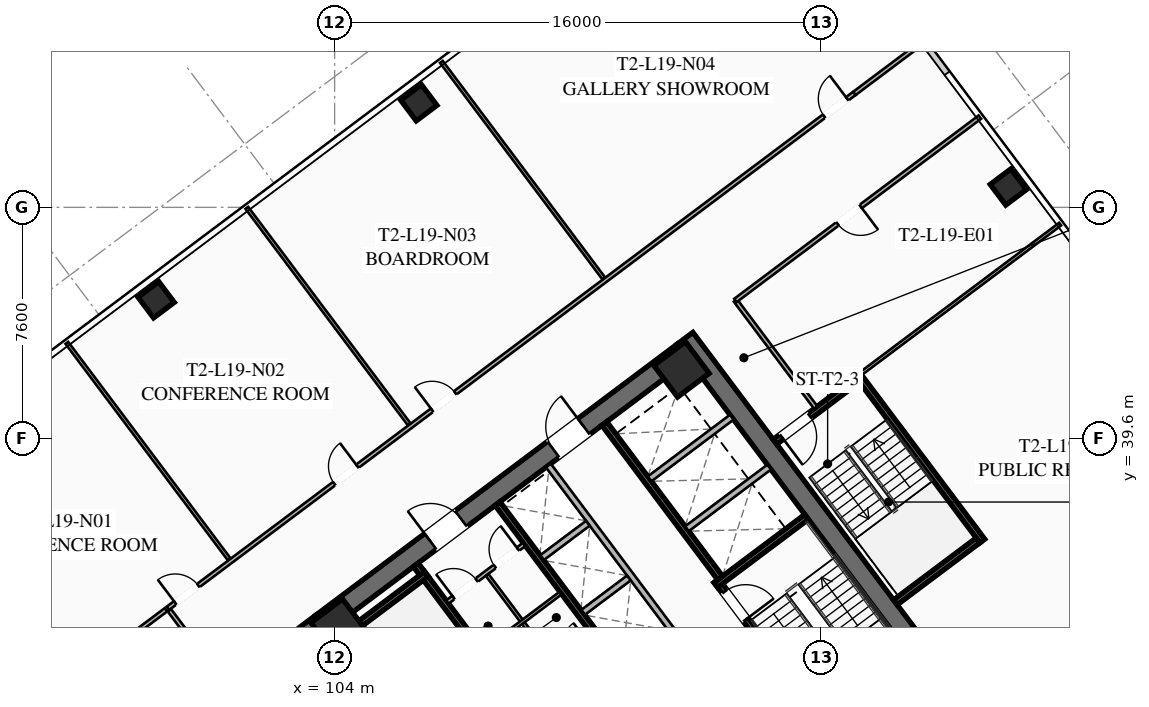
"""IFC4 building model, lengths in metres.
Left out: names, types, materials, properties, quantities, classifications, styles, units other than length and angle.
Written with IfcOpenShell. Run it as: python <this file> out.ifc"""

import sys

from ifc_helpers import new_model, si_unit, direction, frame, frame_2d, origin, origin_2d, place, context, subcontext, project, spatial, rectangle, hollow_rectangle, extrude, element, fill, save


model = new_model("IFC4")
c1 = context("Model", 3, precision=1e-05, world=origin(), true_north=direction((0.0, 1.0)))
c2 = subcontext(c1, "Body", "Model", "MODEL_VIEW")
j1 = project(units=[si_unit("LENGTHUNIT", "METRE"), si_unit("PLANEANGLEUNIT", "RADIAN")], contexts=[c1])
p1 = place(None, origin())
s1 = spatial("IfcSite", under=j1, at=p1, CompositionType="ELEMENT")
p2 = place(p1, origin())
s2 = spatial("IfcBuilding", under=s1, at=p2, CompositionType="ELEMENT")
p3 = place(p2, frame((0.0, 0.0, 74.3)))
s3 = spatial("IfcBuildingStorey", under=s2, at=p3, CompositionType="ELEMENT", Elevation=74.3)
for number, where, z_axis, x_axis in (
    (1, (112.476, 21.107, 0.0), (0.0, 0.0, 1.0), (-0.6, 0.8, 0.0)),
    (2, (115.524, 42.893, 0.0), (0.0, 0.0, 1.0), (0.6, -0.8, 0.0)),
):
    element("IfcWall", number, at=place(p3, frame(where, z_axis=z_axis, x_axis=x_axis)), inside=s3, PredefinedType="SHEAR", context=c2, shape_type="SweptSolid", body=[
        extrude(rectangle(XDim=15.6, YDim=0.65, at=frame_2d((7.8, 0.0))), origin(), (0.0, 0.0, 1.0), 3.55),
    ])
p4 = place(p3, frame((103.571, 33.522, 0.0), z_axis=(0.0, 0.0, 1.0), x_axis=(0.799998028465, 0.600002628705, 0.0)))
e3 = element("IfcWall", 3, at=p4, inside=s3, PredefinedType="SHEAR", context=c2, shape_type="SweptSolid", body=[
    extrude(rectangle(XDim=14.86, YDim=0.65, at=frame_2d((7.43, 0.0))), origin(), (0.0, 0.0, 1.0), 3.55),
])
p5 = place(p4, frame((4.48, 0.0, 0.0)))
e4 = element("IfcOpeningElement", 4, at=p5, cuts=e3, PredefinedType="OPENING", context=c2, shape_type="SweptSolid", body=[
    extrude(rectangle(XDim=1.25, YDim=2.25, at=frame_2d((0.625, 1.125))), frame((0.0, 0.335, 0.0), z_axis=(0.0, -1.0, 0.0), x_axis=(1.0, 0.0, 0.0)), (0.0, 0.0, 1.0), 0.67),
])
p6 = place(p4, frame((9.53, 0.0, 0.0)))
e5 = element("IfcOpeningElement", 5, at=p6, cuts=e3, PredefinedType="OPENING", context=c2, shape_type="SweptSolid", body=[
    extrude(rectangle(XDim=1.25, YDim=2.25, at=frame_2d((0.625, 1.125))), frame((0.0, 0.335, 0.0), z_axis=(0.0, -1.0, 0.0), x_axis=(1.0, 0.0, 0.0)), (0.0, 0.0, 1.0), 0.67),
])
for number, where, z_axis, x_axis in (
    (6, (115.41, 41.87, 0.0), (0.0, 0.0, 1.0), (0.8, 0.6, 0.0)),
    (7, (104.13, 33.41, 0.0), (0.0, 0.0, 1.0), (0.8, 0.6, 0.0)),
):
    element("IfcColumn", number, at=place(p3, frame(where, z_axis=z_axis, x_axis=x_axis)), inside=s3, PredefinedType="COLUMN", context=c2, shape_type="SweptSolid", body=[
        extrude(hollow_rectangle(XDim=1.3, YDim=1.3, WallThickness=0.05, at=origin_2d()), origin(), (0.0, 0.0, 1.0), 3.35),
    ])
for number, where, z_axis, x_axis in (
    (8, (126.16, 47.87, 0.0), (0.0, 0.0, 1.0), (0.8, 0.6, 0.0)),
    (9, (106.77, 50.64, 0.0), (0.0, 0.0, 1.0), (0.8, 0.6, 0.0)),
    (10, (98.13, 44.16, 0.0), (0.0, 0.0, 1.0), (0.8, 0.6, 0.0)),
):
    element("IfcColumn", number, at=place(p3, frame(where, z_axis=z_axis, x_axis=x_axis)), inside=s3, PredefinedType="COLUMN", context=c2, shape_type="SweptSolid", body=[
        extrude(hollow_rectangle(XDim=0.85, YDim=0.85, WallThickness=0.035, at=origin_2d()), origin(), (0.0, 0.0, 1.0), 3.35),
    ])
p7 = place(p3, frame((111.44, 29.08, 0.0), z_axis=(0.0, 0.0, 1.0), x_axis=(-0.600009827119, 0.799992629566, 0.0)))
e11 = element("IfcWall", 11, at=p7, inside=s3, PredefinedType="SHEAR", context=c2, shape_type="SweptSolid", body=[
    extrude(rectangle(XDim=7.95, YDim=0.2, at=frame_2d((3.975, 0.0))), origin(), (0.0, 0.0, 1.0), 3.35),
])
p8 = place(p7, frame((0.45, 0.0, 0.0)))
e12 = element("IfcOpeningElement", 12, at=p8, cuts=e11, PredefinedType="OPENING", context=c2, shape_type="SweptSolid", body=[
    extrude(rectangle(XDim=1.15, YDim=2.2, at=frame_2d((0.575, 1.1))), frame((0.0, 0.11, 0.0), z_axis=(0.0, -1.0, 0.0), x_axis=(1.0, 0.0, 0.0)), (0.0, 0.0, 1.0), 0.22),
])
p9 = place(p3, frame((104.036, 32.902, 0.0), z_axis=(0.0, 0.0, 1.0), x_axis=(0.800039270442, 0.59994763584, 0.0)))
e13 = element("IfcWall", 13, at=p9, inside=s3, PredefinedType="SHEAR", context=c2, shape_type="SweptSolid", body=[
    extrude(rectangle(XDim=3.73, YDim=0.2, at=frame_2d((1.865, 0.0))), origin(), (0.0, 0.0, 1.0), 3.35),
])
p10 = place(p3, frame((116.56, 34.92, 0.0), z_axis=(0.0, 0.0, 1.0), x_axis=(0.600009827119, -0.799992629566, 0.0)))
e14 = element("IfcWall", 14, at=p10, inside=s3, PredefinedType="SHEAR", context=c2, shape_type="SweptSolid", body=[
    extrude(rectangle(XDim=7.95, YDim=0.2, at=frame_2d((3.975, 0.0))), origin(), (0.0, 0.0, 1.0), 3.35),
])
p11 = place(p10, frame((0.45, 0.0, 0.0)))
e15 = element("IfcOpeningElement", 15, at=p11, cuts=e14, PredefinedType="OPENING", context=c2, shape_type="SweptSolid", body=[
    extrude(rectangle(XDim=1.15, YDim=2.2, at=frame_2d((0.575, 1.1))), frame((0.0, 0.11, 0.0), z_axis=(0.0, -1.0, 0.0), x_axis=(1.0, 0.0, 0.0)), (0.0, 0.0, 1.0), 0.22),
])
p12 = place(p3, frame((116.54, 34.78, 0.0), z_axis=(0.0, 0.0, 1.0), x_axis=(0.799984290658, 0.600020945218, 0.0)))
e16 = element("IfcWall", 16, at=p12, inside=s3, PredefinedType="SHEAR", context=c2, shape_type="SweptSolid", body=[
    extrude(rectangle(XDim=3.73, YDim=0.2, at=frame_2d((1.865, 0.0))), origin(), (0.0, 0.0, 1.0), 3.35),
])
p13 = place(p3, frame((117.938, 26.016, 0.0), z_axis=(0.0, 0.0, 1.0), x_axis=(-0.600005463273, 0.799995902516, 0.0)))
e17 = element("IfcWall", 17, at=p13, inside=s3, PredefinedType="SHEAR", context=c2, shape_type="SweptSolid", body=[
    extrude(rectangle(XDim=14.3, YDim=0.2, at=frame_2d((7.15, 0.0))), origin(), (0.0, 0.0, 1.0), 3.35),
])
p14 = place(p3, frame((112.87, 40.09, 0.0), z_axis=(0.0, 0.0, 1.0), x_axis=(0.599975393228, -0.800018454488, 0.0)))
e18 = element("IfcWall", 18, at=p14, inside=s3, PredefinedType="SHEAR", context=c2, shape_type="SweptSolid", body=[
    extrude(rectangle(XDim=6.35, YDim=0.2, at=frame_2d((3.175, 0.0))), origin(), (0.0, 0.0, 1.0), 3.35),
])
for number, where, z_axis, x_axis in (
    (19, (115.59, 36.63, 0.0), (0.0, 0.0, 1.0), (0.8, 0.6, 0.0)),
    (20, (114.36, 38.27, 0.0), (0.0, 0.0, 1.0), (0.8, 0.6, 0.0)),
):
    element("IfcWall", number, at=place(p3, frame(where, z_axis=z_axis, x_axis=x_axis)), inside=s3, PredefinedType="SOLIDWALL", context=c2, shape_type="SweptSolid", body=[
        extrude(rectangle(XDim=3.38, YDim=0.2, at=frame_2d((1.69, 0.0))), origin(), (0.0, 0.0, 1.0), 3.35),
    ])
p15 = place(p3, frame((107.71, 34.22, 0.0), z_axis=(0.0, 0.0, 1.0), x_axis=(0.799981399002, 0.60002480053, 0.0)))
e21 = element("IfcWall", 21, at=p15, inside=s3, PredefinedType="PARTITIONING", context=c2, shape_type="SweptSolid", body=[
    extrude(rectangle(XDim=3.15, YDim=0.135, at=frame_2d((1.575, 0.0))), origin(), (0.0, 0.0, 1.0), 2.703),
])
p16 = place(p15, frame((0.25, 0.0, 0.0)))
e22 = element("IfcOpeningElement", 22, at=p16, cuts=e21, PredefinedType="OPENING", context=c2, shape_type="SweptSolid", body=[
    extrude(rectangle(XDim=0.95, YDim=2.05, at=frame_2d((0.475, 1.025))), frame((0.0, 0.077, 0.0), z_axis=(0.0, -1.0, 0.0), x_axis=(1.0, 0.0, 0.0)), (0.0, 0.0, 1.0), 0.155),
])
p17 = place(p15, frame((1.95, 0.0, 0.0)))
e23 = element("IfcOpeningElement", 23, at=p17, cuts=e21, PredefinedType="OPENING", context=c2, shape_type="SweptSolid", body=[
    extrude(rectangle(XDim=0.95, YDim=2.05, at=frame_2d((0.475, 1.025))), frame((0.0, 0.077, 0.0), z_axis=(0.0, -1.0, 0.0), x_axis=(1.0, 0.0, 0.0)), (0.0, 0.0, 1.0), 0.155),
])
p18 = place(p3, frame((111.296, 32.072, 0.0), z_axis=(0.0, 0.0, 1.0), x_axis=(-0.59995887973, 0.800030838552, 0.0)))
e24 = element("IfcWall", 24, at=p18, inside=s3, PredefinedType="PARTITIONING", context=c2, shape_type="SweptSolid", body=[
    extrude(rectangle(XDim=3.8, YDim=0.11, at=frame_2d((1.9, 0.0))), origin(), (0.0, 0.0, 1.0), 2.703),
])
p19 = place(p3, frame((108.91, 32.62, 0.0), z_axis=(0.0, 0.0, 1.0), x_axis=(0.800018601094, 0.59997519774, 0.0)))
e25 = element("IfcWall", 25, at=p19, inside=s3, PredefinedType="PARTITIONING", context=c2, shape_type="SweptSolid", body=[
    extrude(rectangle(XDim=3.15, YDim=0.11, at=frame_2d((1.575, 0.0))), origin(), (0.0, 0.0, 1.0), 2.703),
])
p20 = place(p3, frame((115.11, 33.27, 0.0), z_axis=(0.0, 0.0, 1.0), x_axis=(-0.600011488909, 0.79999138319, 0.0)))
e26 = element("IfcWall", 26, at=p20, inside=s3, PredefinedType="SOLIDWALL", context=c2, shape_type="SweptSolid", body=[
    extrude(rectangle(XDim=6.8, YDim=0.2, at=frame_2d((3.4, 0.0))), origin(), (0.0, 0.0, 1.0), 3.35),
])
p21 = place(p3, frame((112.176, 33.882, 0.0), z_axis=(0.0, 0.0, 1.0), x_axis=(0.8, 0.6, 0.0)))
e27 = element("IfcWall", 27, at=p21, inside=s3, PredefinedType="SOLIDWALL", context=c2, shape_type="SweptSolid", body=[
    extrude(rectangle(XDim=1.88, YDim=0.2, at=frame_2d((0.94, 0.0))), origin(), (0.0, 0.0, 1.0), 3.35),
])
p22 = place(p3, frame((110.826, 35.682, 0.0), z_axis=(0.0, 0.0, 1.0), x_axis=(0.799984418148, 0.600020775241, 0.0)))
e28 = element("IfcWall", 28, at=p22, inside=s3, PredefinedType="SOLIDWALL", context=c2, shape_type="SweptSolid", body=[
    extrude(rectangle(XDim=1.88, YDim=0.2, at=frame_2d((0.94, 0.0))), origin(), (0.0, 0.0, 1.0), 3.35),
])
p23 = place(p3, frame((125.304, 36.228, 0.0), z_axis=(0.0, 0.0, 1.0), x_axis=(-0.59998851072, 0.800008616831, 0.0)))
e29 = element("IfcWall", 29, at=p23, inside=s3, PredefinedType="SHEAR", context=c2, shape_type="SweptSolid", body=[
    extrude(rectangle(XDim=6.8, YDim=0.2, at=frame_2d((3.4, 0.0))), origin(), (0.0, 0.0, 1.0), 3.35),
])
p24 = place(p3, frame((121.204, 41.528, 0.0), z_axis=(0.0, 0.0, 1.0), x_axis=(-0.800017232136, -0.599977023131, 0.0)))
e30 = element("IfcWall", 30, at=p24, inside=s3, PredefinedType="SHEAR", context=c2, shape_type="SweptSolid", body=[
    extrude(rectangle(XDim=3.4, YDim=0.2, at=frame_2d((1.7, 0.0))), origin(), (0.0, 0.0, 1.0), 3.35),
])
p25 = place(p24, frame((1.975, 0.0, 0.0)))
e31 = element("IfcOpeningElement", 31, at=p25, cuts=e30, PredefinedType="OPENING", context=c2, shape_type="SweptSolid", body=[
    extrude(rectangle(XDim=1.15, YDim=2.2, at=frame_2d((0.575, 1.1))), frame((0.0, 0.11, 0.0), z_axis=(0.0, -1.0, 0.0), x_axis=(1.0, 0.0, 0.0)), (0.0, 0.0, 1.0), 0.22),
])
p26 = place(p3, frame((122.444, 34.208, 0.0), z_axis=(0.0, 0.0, 1.0), x_axis=(0.79999138319, 0.600011488909, 0.0)))
e32 = element("IfcWall", 32, at=p26, inside=s3, PredefinedType="SHEAR", context=c2, shape_type="SweptSolid", body=[
    extrude(rectangle(XDim=3.4, YDim=0.2, at=frame_2d((1.7, 0.0))), origin(), (0.0, 0.0, 1.0), 3.35),
])
p27 = place(p3, frame((119.824, 40.618, 0.0), z_axis=(0.0, 0.0, 1.0), x_axis=(-0.599982243973, 0.800013316712, 0.0)))
e33 = element("IfcWall", 33, at=p27, inside=s3, PredefinedType="PARTITIONING", context=c2, shape_type="SweptSolid", body=[
    extrude(rectangle(XDim=4.4, YDim=0.135, at=frame_2d((2.2, 0.0))), origin(), (0.0, 0.0, 1.0), 2.703),
])
p28 = place(p3, frame((98.516, 34.012, 0.0), z_axis=(0.0, 0.0, 1.0), x_axis=(0.8, 0.6, 0.0)))
e34 = element("IfcWall", 34, at=p28, inside=s3, PredefinedType="PARTITIONING", context=c2, shape_type="SweptSolid", body=[
    extrude(rectangle(XDim=28.23, YDim=0.135, at=frame_2d((14.115, 0.0))), origin(), (0.0, 0.0, 1.0), 2.703),
])
p29 = place(p28, frame((0.3, 0.0, 0.0)))
e35 = element("IfcOpeningElement", 35, at=p29, cuts=e34, PredefinedType="OPENING", context=c2, shape_type="SweptSolid", body=[
    extrude(rectangle(XDim=0.95, YDim=2.05, at=frame_2d((0.475, 1.025))), frame((0.0, 0.077, 0.0), z_axis=(0.0, -1.0, 0.0), x_axis=(1.0, 0.0, 0.0)), (0.0, 0.0, 1.0), 0.155),
])
p30 = place(p28, frame((6.84, 0.0, 0.0)))
e36 = element("IfcOpeningElement", 36, at=p30, cuts=e34, PredefinedType="OPENING", context=c2, shape_type="SweptSolid", body=[
    extrude(rectangle(XDim=0.95, YDim=2.05, at=frame_2d((0.475, 1.025))), frame((0.0, 0.077, 0.0), z_axis=(0.0, -1.0, 0.0), x_axis=(1.0, 0.0, 0.0)), (0.0, 0.0, 1.0), 0.155),
])
p31 = place(p28, frame((10.863, 0.0, 0.0)))
e37 = element("IfcOpeningElement", 37, at=p31, cuts=e34, PredefinedType="OPENING", context=c2, shape_type="SweptSolid", body=[
    extrude(rectangle(XDim=0.95, YDim=2.05, at=frame_2d((0.475, 1.025))), frame((0.0, 0.077, 0.0), z_axis=(0.0, -1.0, 0.0), x_axis=(1.0, 0.0, 0.0)), (0.0, 0.0, 1.0), 0.155),
])
p32 = place(p28, frame((26.98, 0.0, 0.0)))
e38 = element("IfcOpeningElement", 38, at=p32, cuts=e34, PredefinedType="OPENING", context=c2, shape_type="SweptSolid", body=[
    extrude(rectangle(XDim=0.95, YDim=2.05, at=frame_2d((0.475, 1.025))), frame((0.0, 0.077, 0.0), z_axis=(0.0, -1.0, 0.0), x_axis=(1.0, 0.0, 0.0)), (0.0, 0.0, 1.0), 0.155),
])
p33 = place(p3, frame((121.1, 50.95, 0.0), z_axis=(0.0, 0.0, 1.0), x_axis=(0.799989647378, 0.600013803248, 0.0)))
e39 = element("IfcWall", 39, at=p33, inside=s3, PredefinedType="PARTITIONING", context=c2, shape_type="SweptSolid", body=[
    extrude(rectangle(XDim=2.83, YDim=0.135, at=frame_2d((1.415, 0.0))), origin(), (0.0, 0.0, 1.0), 2.703),
])
for number, where, z_axis, x_axis in (
    (40, (100.532, 35.624, 0.0), (0.0, 0.0, 1.0), (-0.6, 0.8, 0.0)),
    (41, (106.452, 40.064, 0.0), (0.0, 0.0, 1.0), (-0.6, 0.8, 0.0)),
    (42, (112.852, 44.864, 0.0), (0.0, 0.0, 1.0), (-0.6, 0.8, 0.0)),
):
    element("IfcWall", number, at=place(p3, frame(where, z_axis=z_axis, x_axis=x_axis)), inside=s3, PredefinedType="PARTITIONING", context=c2, shape_type="SweptSolid", body=[
        extrude(rectangle(XDim=8.9, YDim=0.11, at=frame_2d((4.45, 0.0))), origin(), (0.0, 0.0, 1.0), 2.703),
    ])
p34 = place(p3, frame((134.18, 33.51, 0.0), z_axis=(0.0, 0.0, 1.0), x_axis=(-0.8, -0.6, 0.0)))
e43 = element("IfcWall", 43, at=p34, inside=s3, PredefinedType="PARTITIONING", context=c2, shape_type="SweptSolid", body=[
    extrude(rectangle(XDim=28.23, YDim=0.135, at=frame_2d((14.115, 0.0))), origin(), (0.0, 0.0, 1.0), 2.703),
])
p35 = place(p34, frame((26.9, 0.0, 0.0)))
e44 = element("IfcOpeningElement", 44, at=p35, cuts=e43, PredefinedType="OPENING", context=c2, shape_type="SweptSolid", body=[
    extrude(rectangle(XDim=0.95, YDim=2.05, at=frame_2d((0.475, 1.025))), frame((0.0, 0.077, 0.0), z_axis=(0.0, -1.0, 0.0), x_axis=(1.0, 0.0, 0.0)), (0.0, 0.0, 1.0), 0.155),
])
p36 = place(p34, frame((20.399, 0.0, 0.0)))
e45 = element("IfcOpeningElement", 45, at=p36, cuts=e43, PredefinedType="OPENING", context=c2, shape_type="SweptSolid", body=[
    extrude(rectangle(XDim=0.95, YDim=2.05, at=frame_2d((0.475, 1.025))), frame((0.0, 0.077, 0.0), z_axis=(0.0, -1.0, 0.0), x_axis=(1.0, 0.0, 0.0)), (0.0, 0.0, 1.0), 0.155),
])
p37 = place(p34, frame((16.339, 0.0, 0.0)))
e46 = element("IfcOpeningElement", 46, at=p37, cuts=e43, PredefinedType="OPENING", context=c2, shape_type="SweptSolid", body=[
    extrude(rectangle(XDim=0.95, YDim=2.05, at=frame_2d((0.475, 1.025))), frame((0.0, 0.077, 0.0), z_axis=(0.0, -1.0, 0.0), x_axis=(1.0, 0.0, 0.0)), (0.0, 0.0, 1.0), 0.155),
])
p38 = place(p34, frame((0.38, 0.0, 0.0)))
e47 = element("IfcOpeningElement", 47, at=p38, cuts=e43, PredefinedType="OPENING", context=c2, shape_type="SweptSolid", body=[
    extrude(rectangle(XDim=0.95, YDim=2.05, at=frame_2d((0.475, 1.025))), frame((0.0, 0.077, 0.0), z_axis=(0.0, -1.0, 0.0), x_axis=(1.0, 0.0, 0.0)), (0.0, 0.0, 1.0), 0.155),
])
p39 = place(p3, frame((125.224, 50.168, 0.0), z_axis=(0.0, 0.0, 1.0), x_axis=(-0.8, -0.6, 0.0)))
e48 = element("IfcWall", 48, at=p39, inside=s3, PredefinedType="PARTITIONING", context=c2, shape_type="SweptSolid", body=[
    extrude(rectangle(XDim=10.05, YDim=0.135, at=frame_2d((5.025, 0.0))), origin(), (0.0, 0.0, 1.0), 2.703),
])
p40 = place(p39, frame((4.9, 0.0, 0.0)))
e49 = element("IfcOpeningElement", 49, at=p40, cuts=e48, PredefinedType="OPENING", context=c2, shape_type="SweptSolid", body=[
    extrude(rectangle(XDim=0.95, YDim=2.05, at=frame_2d((0.475, 1.025))), frame((0.0, 0.077, 0.0), z_axis=(0.0, -1.0, 0.0), x_axis=(1.0, 0.0, 0.0)), (0.0, 0.0, 1.0), 0.155),
])
p41 = place(p3, frame((125.208, 30.656, 0.0), z_axis=(0.0, 0.0, 1.0), x_axis=(0.8, 0.6, 0.0)))
e50 = element("IfcWall", 50, at=p41, inside=s3, PredefinedType="PARTITIONING", context=c2, shape_type="SweptSolid", body=[
    extrude(rectangle(XDim=11.72, YDim=0.135, at=frame_2d((5.86, 0.0))), origin(), (0.0, 0.0, 1.0), 2.703),
])
p42 = place(p41, frame((2.045, 0.0, 0.0)))
e51 = element("IfcOpeningElement", 51, at=p42, cuts=e50, PredefinedType="OPENING", context=c2, shape_type="SweptSolid", body=[
    extrude(rectangle(XDim=0.95, YDim=2.05, at=frame_2d((0.475, 1.025))), frame((0.0, 0.077, 0.0), z_axis=(0.0, -1.0, 0.0), x_axis=(1.0, 0.0, 0.0)), (0.0, 0.0, 1.0), 0.155),
])
p43 = place(p3, frame((127.864, 46.648, 0.0), z_axis=(0.0, 0.0, 1.0), x_axis=(-0.800007145523, -0.599990472518, 0.0)))
e52 = element("IfcWall", 52, at=p43, inside=s3, PredefinedType="PARTITIONING", context=c2, shape_type="SweptSolid", body=[
    extrude(rectangle(XDim=8.2, YDim=0.11, at=frame_2d((4.1, 0.0))), origin(), (0.0, 0.0, 1.0), 2.703),
])
p44 = place(p3, frame((111.548, 16.636, 0.0), z_axis=(0.0, 0.0, 1.0), x_axis=(-0.600003610192, 0.799997292343, 0.0)))
e53 = element("IfcWall", 53, at=p44, inside=s3, PredefinedType="PARTITIONING", context=c2, shape_type="SweptSolid", body=[
    extrude(rectangle(XDim=21.64, YDim=0.135, at=frame_2d((10.82, 0.0))), origin(), (0.0, 0.0, 1.0), 2.703),
])
p45 = place(p44, frame((0.3, 0.0, 0.0)))
e54 = element("IfcOpeningElement", 54, at=p45, cuts=e53, PredefinedType="OPENING", context=c2, shape_type="SweptSolid", body=[
    extrude(rectangle(XDim=0.95, YDim=2.05, at=frame_2d((0.475, 1.025))), frame((0.0, 0.077, 0.0), z_axis=(0.0, -1.0, 0.0), x_axis=(1.0, 0.0, 0.0)), (0.0, 0.0, 1.0), 0.155),
])
p46 = place(p3, frame((98.452, 33.964, 0.0), z_axis=(0.0, 0.0, 1.0), x_axis=(-0.799993202584, -0.600009063115, 0.0)))
e55 = element("IfcWall", 55, at=p46, inside=s3, PredefinedType="PARTITIONING", context=c2, shape_type="SweptSolid", body=[
    extrude(rectangle(XDim=8.62, YDim=0.135, at=frame_2d((4.31, 0.0))), origin(), (0.0, 0.0, 1.0), 2.703),
])
p47 = place(p5, origin())
e56 = element("IfcDoor", 56, at=p47, inside=s3, OperationType="SINGLE_SWING_LEFT", PredefinedType="DOOR", context=c2, shape_type="SweptSolid", body=[
    extrude(rectangle(XDim=1.25, YDim=2.25, at=frame_2d((0.625, 1.125))), frame((0.0, 0.025, 0.0), z_axis=(0.0, -1.0, 0.0), x_axis=(1.0, 0.0, 0.0)), (0.0, 0.0, 1.0), 0.05),
])
fill(e4, e56)
p48 = place(p6, origin())
e57 = element("IfcDoor", 57, at=p48, inside=s3, OperationType="SINGLE_SWING_RIGHT", PredefinedType="DOOR", context=c2, shape_type="SweptSolid", body=[
    extrude(rectangle(XDim=1.25, YDim=2.25, at=frame_2d((0.625, 1.125))), frame((0.0, 0.025, 0.0), z_axis=(0.0, -1.0, 0.0), x_axis=(1.0, 0.0, 0.0)), (0.0, 0.0, 1.0), 0.05),
])
fill(e5, e57)
p49 = place(p11, origin())
e58 = element("IfcDoor", 58, at=p49, inside=s3, OperationType="SINGLE_SWING_RIGHT", PredefinedType="DOOR", context=c2, shape_type="SweptSolid", body=[
    extrude(rectangle(XDim=1.15, YDim=2.2, at=frame_2d((0.575, 1.1))), frame((0.0, 0.025, 0.0), z_axis=(0.0, -1.0, 0.0), x_axis=(1.0, 0.0, 0.0)), (0.0, 0.0, 1.0), 0.05),
])
fill(e15, e58)
p50 = place(p16, origin())
e59 = element("IfcDoor", 59, at=p50, inside=s3, OperationType="SINGLE_SWING_LEFT", PredefinedType="DOOR", context=c2, shape_type="SweptSolid", body=[
    extrude(rectangle(XDim=0.95, YDim=2.05, at=frame_2d((0.475, 1.025))), frame((0.0, 0.025, 0.0), z_axis=(0.0, -1.0, 0.0), x_axis=(1.0, 0.0, 0.0)), (0.0, 0.0, 1.0), 0.05),
])
fill(e22, e59)
p51 = place(p17, origin())
e60 = element("IfcDoor", 60, at=p51, inside=s3, OperationType="SINGLE_SWING_RIGHT", PredefinedType="DOOR", context=c2, shape_type="SweptSolid", body=[
    extrude(rectangle(XDim=0.95, YDim=2.05, at=frame_2d((0.475, 1.025))), frame((0.0, 0.025, 0.0), z_axis=(0.0, -1.0, 0.0), x_axis=(1.0, 0.0, 0.0)), (0.0, 0.0, 1.0), 0.05),
])
fill(e23, e60)
p52 = place(p25, origin())
e61 = element("IfcDoor", 61, at=p52, inside=s3, OperationType="SINGLE_SWING_RIGHT", PredefinedType="DOOR", context=c2, shape_type="SweptSolid", body=[
    extrude(rectangle(XDim=1.15, YDim=2.2, at=frame_2d((0.575, 1.1))), frame((0.0, 0.025, 0.0), z_axis=(0.0, -1.0, 0.0), x_axis=(1.0, 0.0, 0.0)), (0.0, 0.0, 1.0), 0.05),
])
fill(e31, e61)
p53 = place(p29, origin())
e62 = element("IfcDoor", 62, at=p53, inside=s3, OperationType="SINGLE_SWING_LEFT", PredefinedType="DOOR", context=c2, shape_type="SweptSolid", body=[
    extrude(rectangle(XDim=0.95, YDim=2.05, at=frame_2d((0.475, 1.025))), frame((0.0, 0.025, 0.0), z_axis=(0.0, -1.0, 0.0), x_axis=(1.0, 0.0, 0.0)), (0.0, 0.0, 1.0), 0.05),
])
fill(e35, e62)
p54 = place(p30, origin())
e63 = element("IfcDoor", 63, at=p54, inside=s3, OperationType="SINGLE_SWING_RIGHT", PredefinedType="DOOR", context=c2, shape_type="SweptSolid", body=[
    extrude(rectangle(XDim=0.95, YDim=2.05, at=frame_2d((0.475, 1.025))), frame((0.0, 0.025, 0.0), z_axis=(0.0, -1.0, 0.0), x_axis=(1.0, 0.0, 0.0)), (0.0, 0.0, 1.0), 0.05),
])
fill(e36, e63)
p55 = place(p31, origin())
e64 = element("IfcDoor", 64, at=p55, inside=s3, OperationType="SINGLE_SWING_LEFT", PredefinedType="DOOR", context=c2, shape_type="SweptSolid", body=[
    extrude(rectangle(XDim=0.95, YDim=2.05, at=frame_2d((0.475, 1.025))), frame((0.0, 0.025, 0.0), z_axis=(0.0, -1.0, 0.0), x_axis=(1.0, 0.0, 0.0)), (0.0, 0.0, 1.0), 0.05),
])
fill(e37, e64)
p56 = place(p32, origin())
e65 = element("IfcDoor", 65, at=p56, inside=s3, OperationType="SINGLE_SWING_RIGHT", PredefinedType="DOOR", context=c2, shape_type="SweptSolid", body=[
    extrude(rectangle(XDim=0.95, YDim=2.05, at=frame_2d((0.475, 1.025))), frame((0.0, 0.025, 0.0), z_axis=(0.0, -1.0, 0.0), x_axis=(1.0, 0.0, 0.0)), (0.0, 0.0, 1.0), 0.05),
])
fill(e38, e65)
p57 = place(p40, origin())
e66 = element("IfcDoor", 66, at=p57, inside=s3, OperationType="SINGLE_SWING_LEFT", PredefinedType="DOOR", context=c2, shape_type="SweptSolid", body=[
    extrude(rectangle(XDim=0.95, YDim=2.05, at=frame_2d((0.475, 1.025))), frame((0.0, 0.025, 0.0), z_axis=(0.0, -1.0, 0.0), x_axis=(1.0, 0.0, 0.0)), (0.0, 0.0, 1.0), 0.05),
])
fill(e49, e66)
save(model, sys.argv[1])
